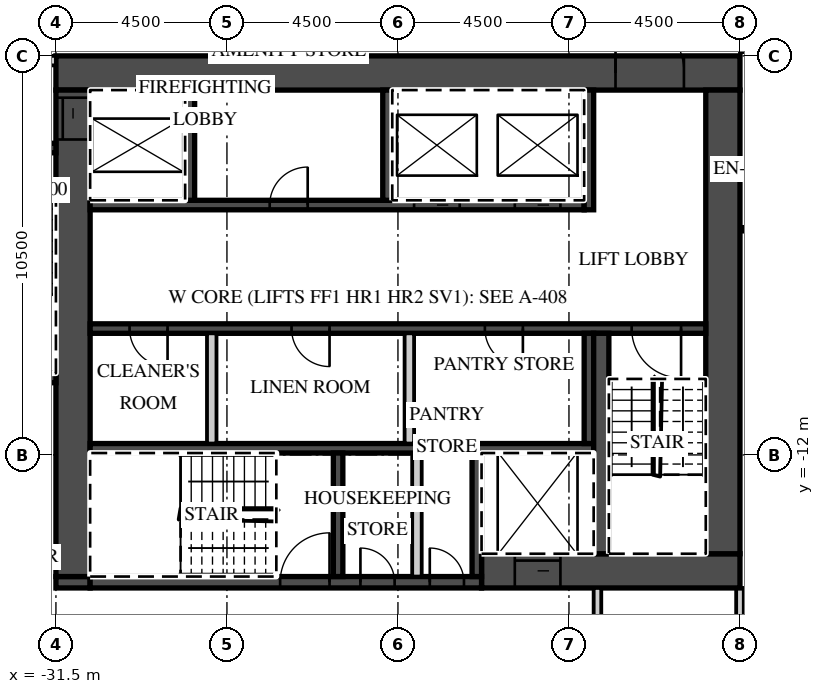
"""IFC4 building model, lengths in metres.
Left out: names, types, materials, properties, quantities, classifications, styles, units other than length and angle.
Written with IfcOpenShell. Run it as: python <this file> out.ifc"""

import sys

from ifc_helpers import new_model, si_unit, direction, frame, frame_2d, origin, place, context, subcontext, project, spatial, rectangle, extrude, element, fill, save


model = new_model("IFC4")
c1 = context("Model", 3, precision=1e-05, world=origin(), true_north=direction((0.0, 1.0)))
c2 = subcontext(c1, "Body", "Model", "MODEL_VIEW")
j1 = project(units=[si_unit("LENGTHUNIT", "METRE"), si_unit("PLANEANGLEUNIT", "RADIAN")], contexts=[c1])
p1 = place(None, origin())
s1 = spatial("IfcSite", under=j1, at=p1, CompositionType="ELEMENT")
p2 = place(p1, origin())
s2 = spatial("IfcBuilding", under=s1, at=p2, CompositionType="ELEMENT")
p3 = place(p2, frame((0.0, 0.0, 278.4)))
s3 = spatial("IfcBuildingStorey", under=s2, at=p3, CompositionType="ELEMENT", Elevation=278.4)
p4 = place(p3, frame((-13.5, -21.396, 0.0), z_axis=(0.0, 0.0, 1.0), x_axis=(0.0, 1.0, 0.0)))
e1 = element("IfcWall", 1, at=p4, inside=s3, PredefinedType="PARTITIONING", context=c2, shape_type="SweptSolid", body=[
    extrude(rectangle(XDim=5.896, YDim=0.2, at=frame_2d((2.948, 0.0))), origin(), (0.0, 0.0, 1.0), 3.02),
])
p5 = place(p3, frame((-13.5, -1.3, 0.0), z_axis=(0.0, 0.0, 1.0), x_axis=(1.0, 0.0, 0.0)))
e2 = element("IfcWall", 2, at=p5, inside=s3, PredefinedType="PARTITIONING", context=c2, shape_type="SweptSolid", body=[
    extrude(rectangle(XDim=50.293, YDim=0.2, at=frame_2d((25.146, 0.0))), origin(), (0.0, 0.0, 1.0), 3.02),
])
p6 = place(p5, frame((2.925, 0.0, 0.0)))
e3 = element("IfcOpeningElement", 3, at=p6, cuts=e2, PredefinedType="OPENING", context=c2, shape_type="SweptSolid", body=[
    extrude(rectangle(XDim=1.0, YDim=2.1, at=frame_2d((0.5, 1.05))), frame((0.0, 0.11, 0.0), z_axis=(0.0, -1.0, 0.0), x_axis=(1.0, 0.0, 0.0)), (0.0, 0.0, 1.0), 0.22),
])
p7 = place(p5, frame((6.938, 0.0, 0.0)))
e4 = element("IfcOpeningElement", 4, at=p7, cuts=e2, PredefinedType="OPENING", context=c2, shape_type="SweptSolid", body=[
    extrude(rectangle(XDim=1.2, YDim=2.1, at=frame_2d((0.6, 1.05))), frame((0.0, 0.11, 0.0), z_axis=(0.0, -1.0, 0.0), x_axis=(1.0, 0.0, 0.0)), (0.0, 0.0, 1.0), 0.22),
])
p8 = place(p5, frame((14.075, 0.0, 0.0)))
e5 = element("IfcOpeningElement", 5, at=p8, cuts=e2, PredefinedType="OPENING", context=c2, shape_type="SweptSolid", body=[
    extrude(rectangle(XDim=1.0, YDim=2.1, at=frame_2d((0.5, 1.05))), frame((0.0, 0.11, 0.0), z_axis=(0.0, -1.0, 0.0), x_axis=(1.0, 0.0, 0.0)), (0.0, 0.0, 1.0), 0.22),
])
p9 = place(p5, frame((18.55, 0.0, 0.0)))
e6 = element("IfcOpeningElement", 6, at=p9, cuts=e2, PredefinedType="OPENING", context=c2, shape_type="SweptSolid", body=[
    extrude(rectangle(XDim=1.0, YDim=2.1, at=frame_2d((0.5, 1.05))), frame((0.0, 0.11, 0.0), z_axis=(0.0, -1.0, 0.0), x_axis=(1.0, 0.0, 0.0)), (0.0, 0.0, 1.0), 0.22),
])
p10 = place(p5, frame((23.075, 0.0, 0.0)))
e7 = element("IfcOpeningElement", 7, at=p10, cuts=e2, PredefinedType="OPENING", context=c2, shape_type="SweptSolid", body=[
    extrude(rectangle(XDim=1.0, YDim=2.1, at=frame_2d((0.5, 1.05))), frame((0.0, 0.11, 0.0), z_axis=(0.0, -1.0, 0.0), x_axis=(1.0, 0.0, 0.0)), (0.0, 0.0, 1.0), 0.22),
])
p11 = place(p5, frame((29.925, 0.0, 0.0)))
e8 = element("IfcOpeningElement", 8, at=p11, cuts=e2, PredefinedType="OPENING", context=c2, shape_type="SweptSolid", body=[
    extrude(rectangle(XDim=1.0, YDim=2.1, at=frame_2d((0.5, 1.05))), frame((0.0, 0.11, 0.0), z_axis=(0.0, -1.0, 0.0), x_axis=(1.0, 0.0, 0.0)), (0.0, 0.0, 1.0), 0.22),
])
p12 = place(p5, frame((32.075, 0.0, 0.0)))
e9 = element("IfcOpeningElement", 9, at=p12, cuts=e2, PredefinedType="OPENING", context=c2, shape_type="SweptSolid", body=[
    extrude(rectangle(XDim=1.0, YDim=2.1, at=frame_2d((0.5, 1.05))), frame((0.0, 0.11, 0.0), z_axis=(0.0, -1.0, 0.0), x_axis=(1.0, 0.0, 0.0)), (0.0, 0.0, 1.0), 0.22),
])
p13 = place(p5, frame((36.55, 0.0, 0.0)))
e10 = element("IfcOpeningElement", 10, at=p13, cuts=e2, PredefinedType="OPENING", context=c2, shape_type="SweptSolid", body=[
    extrude(rectangle(XDim=1.0, YDim=2.1, at=frame_2d((0.5, 1.05))), frame((0.0, 0.11, 0.0), z_axis=(0.0, -1.0, 0.0), x_axis=(1.0, 0.0, 0.0)), (0.0, 0.0, 1.0), 0.22),
])
p14 = place(p5, frame((42.938, 0.0, 0.0)))
e11 = element("IfcOpeningElement", 11, at=p14, cuts=e2, PredefinedType="OPENING", context=c2, shape_type="SweptSolid", body=[
    extrude(rectangle(XDim=1.2, YDim=2.1, at=frame_2d((0.6, 1.05))), frame((0.0, 0.11, 0.0), z_axis=(0.0, -1.0, 0.0), x_axis=(1.0, 0.0, 0.0)), (0.0, 0.0, 1.0), 0.22),
])
p15 = place(p3, frame((-31.5, -1.95, 0.0), z_axis=(0.0, 0.0, 1.0), x_axis=(1.0, 0.0, 0.0)))
e12 = element("IfcWall", 12, at=p15, inside=s3, PredefinedType="SHEAR", context=c2, shape_type="SweptSolid", body=[
    extrude(rectangle(XDim=18.0, YDim=0.9, at=frame_2d((9.0, 0.0))), origin(), (0.0, 0.0, 1.0), 3.02),
])
p16 = place(p15, frame((14.725, 0.0, 0.0)))
e13 = element("IfcOpeningElement", 13, at=p16, cuts=e12, PredefinedType="OPENING", context=c2, shape_type="SweptSolid", body=[
    extrude(rectangle(XDim=1.8, YDim=2.1, at=frame_2d((0.9, 1.05))), frame((0.0, 0.46, 0.0), z_axis=(0.0, -1.0, 0.0), x_axis=(1.0, 0.0, 0.0)), (0.0, 0.0, 1.0), 0.92),
])
p17 = place(p3, frame((-20.3, -15.05, 0.0), z_axis=(0.0, 0.0, 1.0), x_axis=(1.0, 0.0, 0.0)))
e14 = element("IfcWall", 14, at=p17, inside=s3, PredefinedType="SHEAR", context=c2, shape_type="SweptSolid", body=[
    extrude(rectangle(XDim=6.8, YDim=0.9, at=frame_2d((3.4, 0.0))), origin(), (0.0, 0.0, 1.0), 3.02),
])
p18 = place(p17, frame((0.875, 0.0, 0.0)))
e15 = element("IfcOpeningElement", 15, at=p18, cuts=e14, PredefinedType="OPENING", context=c2, shape_type="SweptSolid", body=[
    extrude(rectangle(XDim=1.2, YDim=2.1, at=frame_2d((0.6, 1.05))), frame((0.0, 0.46, 0.0), z_axis=(0.0, -1.0, 0.0), x_axis=(1.0, 0.0, 0.0)), (0.0, 0.0, 1.0), 0.92),
])
p19 = place(p3, frame((-31.5, -15.35, 0.0), z_axis=(0.0, 0.0, 1.0), x_axis=(1.0, 0.0, 0.0)))
e16 = element("IfcWall", 16, at=p19, inside=s3, PredefinedType="SHEAR", context=c2, shape_type="SweptSolid", body=[
    extrude(rectangle(XDim=0.9, YDim=0.3, at=frame_2d((0.45, 0.0))), origin(), (0.0, 0.0, 1.0), 3.02),
])
p20 = place(p3, frame((-30.6, -15.35, 0.0), z_axis=(0.0, 0.0, 1.0), x_axis=(1.0, 0.0, 0.0)))
e17 = element("IfcWall", 17, at=p20, inside=s3, PredefinedType="SHEAR", context=c2, shape_type="SweptSolid", body=[
    extrude(rectangle(XDim=10.3, YDim=0.3, at=frame_2d((5.15, 0.0))), origin(), (0.0, 0.0, 1.0), 3.02),
])
p21 = place(p20, frame((5.0, 0.0, 0.0)))
e18 = element("IfcOpeningElement", 18, at=p21, cuts=e17, PredefinedType="OPENING", context=c2, shape_type="SweptSolid", body=[
    extrude(rectangle(XDim=1.3, YDim=2.1, at=frame_2d((0.65, 1.05))), frame((0.0, 0.16, 0.0), z_axis=(0.0, -1.0, 0.0), x_axis=(1.0, 0.0, 0.0)), (0.0, 0.0, 1.0), 0.32),
])
p22 = place(p20, frame((7.113, 0.0, 0.0)))
e19 = element("IfcOpeningElement", 19, at=p22, cuts=e17, PredefinedType="OPENING", context=c2, shape_type="SweptSolid", body=[
    extrude(rectangle(XDim=0.9, YDim=2.1, at=frame_2d((0.45, 1.05))), frame((0.0, 0.16, 0.0), z_axis=(0.0, -1.0, 0.0), x_axis=(1.0, 0.0, 0.0)), (0.0, 0.0, 1.0), 0.32),
])
p23 = place(p20, frame((8.938, 0.0, 0.0)))
e20 = element("IfcOpeningElement", 20, at=p23, cuts=e17, PredefinedType="OPENING", context=c2, shape_type="SweptSolid", body=[
    extrude(rectangle(XDim=0.9, YDim=2.1, at=frame_2d((0.45, 1.05))), frame((0.0, 0.16, 0.0), z_axis=(0.0, -1.0, 0.0), x_axis=(1.0, 0.0, 0.0)), (0.0, 0.0, 1.0), 0.32),
])
p24 = place(p3, frame((-31.05, -15.2, 0.0), z_axis=(0.0, 0.0, 1.0), x_axis=(0.0, 1.0, 0.0)))
e21 = element("IfcWall", 21, at=p24, inside=s3, PredefinedType="SHEAR", context=c2, shape_type="SweptSolid", body=[
    extrude(rectangle(XDim=12.8, YDim=0.9, at=frame_2d((6.4, 0.0))), origin(), (0.0, 0.0, 1.0), 3.02),
])
p25 = place(p24, frame((11.5, 0.0, 0.0)))
e22 = element("IfcOpeningElement", 22, at=p25, cuts=e21, PredefinedType="OPENING", context=c2, shape_type="SweptSolid", body=[
    extrude(rectangle(XDim=1.1, YDim=2.1, at=frame_2d((0.55, 1.05))), frame((0.0, 0.46, 0.0), z_axis=(0.0, -1.0, 0.0), x_axis=(1.0, 0.0, 0.0)), (0.0, 0.0, 1.0), 0.92),
])
p26 = place(p3, frame((-13.95, -14.6, 0.0), z_axis=(0.0, 0.0, 1.0), x_axis=(0.0, 1.0, 0.0)))
e23 = element("IfcWall", 23, at=p26, inside=s3, PredefinedType="SHEAR", context=c2, shape_type="SweptSolid", body=[
    extrude(rectangle(XDim=12.2, YDim=0.9, at=frame_2d((6.1, 0.0))), origin(), (0.0, 0.0, 1.0), 3.02),
])
p27 = place(p3, frame((-30.6, -5.425, 0.0), z_axis=(0.0, 0.0, 1.0), x_axis=(1.0, 0.0, 0.0)))
e24 = element("IfcWall", 24, at=p27, inside=s3, PredefinedType="SHEAR", context=c2, shape_type="SweptSolid", body=[
    extrude(rectangle(XDim=13.0, YDim=0.25, at=frame_2d((6.5, 0.0))), origin(), (0.0, 0.0, 1.0), 3.02),
])
p28 = place(p27, frame((8.525, 0.0, 0.0)))
e25 = element("IfcOpeningElement", 25, at=p28, cuts=e24, PredefinedType="OPENING", context=c2, shape_type="SweptSolid", body=[
    extrude(rectangle(XDim=1.2, YDim=2.1, at=frame_2d((0.6, 1.05))), frame((0.0, 0.135, 0.0), z_axis=(0.0, -1.0, 0.0), x_axis=(1.0, 0.0, 0.0)), (0.0, 0.0, 1.0), 0.27),
])
p29 = place(p27, frame((11.175, 0.0, 0.0)))
e26 = element("IfcOpeningElement", 26, at=p29, cuts=e24, PredefinedType="OPENING", context=c2, shape_type="SweptSolid", body=[
    extrude(rectangle(XDim=1.2, YDim=2.1, at=frame_2d((0.6, 1.05))), frame((0.0, 0.135, 0.0), z_axis=(0.0, -1.0, 0.0), x_axis=(1.0, 0.0, 0.0)), (0.0, 0.0, 1.0), 0.27),
])
p30 = place(p27, frame((4.725, 0.0, 0.0)))
e27 = element("IfcOpeningElement", 27, at=p30, cuts=e24, PredefinedType="OPENING", context=c2, shape_type="SweptSolid", body=[
    extrude(rectangle(XDim=1.0, YDim=2.1, at=frame_2d((0.5, 1.05))), frame((0.0, 0.135, 0.0), z_axis=(0.0, -1.0, 0.0), x_axis=(1.0, 0.0, 0.0)), (0.0, 0.0, 1.0), 0.27),
])
p31 = place(p3, frame((-17.475, -5.55, 0.0), z_axis=(0.0, 0.0, 1.0), x_axis=(0.0, 1.0, 0.0)))
e28 = element("IfcWall", 28, at=p31, inside=s3, PredefinedType="SHEAR", context=c2, shape_type="SweptSolid", body=[
    extrude(rectangle(XDim=3.15, YDim=0.25, at=frame_2d((1.575, 0.0))), origin(), (0.0, 0.0, 1.0), 3.02),
])
for number, where, z_axis, x_axis in (
    (29, (-27.975, -5.3, 0.0), (0.0, 0.0, 1.0), (0.0, 1.0, 0.0)),
    (30, (-22.775, -5.3, 0.0), (0.0, 0.0, 1.0), (0.0, 1.0, 0.0)),
):
    element("IfcWall", number, at=place(p3, frame(where, z_axis=z_axis, x_axis=x_axis)), inside=s3, PredefinedType="SHEAR", context=c2, shape_type="SweptSolid", body=[
        extrude(rectangle(XDim=2.9, YDim=0.25, at=frame_2d((1.45, 0.0))), origin(), (0.0, 0.0, 1.0), 3.02),
    ])
p32 = place(p3, frame((-30.6, -8.675, 0.0), z_axis=(0.0, 0.0, 1.0), x_axis=(1.0, 0.0, 0.0)))
e31 = element("IfcWall", 31, at=p32, inside=s3, PredefinedType="SHEAR", context=c2, shape_type="SweptSolid", body=[
    extrude(rectangle(XDim=16.2, YDim=0.25, at=frame_2d((8.1, 0.0))), origin(), (0.0, 0.0, 1.0), 3.02),
])
p33 = place(p32, frame((14.25, 0.0, 0.0)))
e32 = element("IfcOpeningElement", 32, at=p33, cuts=e31, PredefinedType="OPENING", context=c2, shape_type="SweptSolid", body=[
    extrude(rectangle(XDim=1.3, YDim=2.1, at=frame_2d((0.65, 1.05))), frame((0.0, 0.135, 0.0), z_axis=(0.0, -1.0, 0.0), x_axis=(1.0, 0.0, 0.0)), (0.0, 0.0, 1.0), 0.27),
])
p34 = place(p32, frame((1.038, 0.0, 0.0)))
e33 = element("IfcOpeningElement", 33, at=p34, cuts=e31, PredefinedType="OPENING", context=c2, shape_type="SweptSolid", body=[
    extrude(rectangle(XDim=1.0, YDim=2.1, at=frame_2d((0.5, 1.05))), frame((0.0, 0.135, 0.0), z_axis=(0.0, -1.0, 0.0), x_axis=(1.0, 0.0, 0.0)), (0.0, 0.0, 1.0), 0.27),
])
p35 = place(p32, frame((5.3, 0.0, 0.0)))
e34 = element("IfcOpeningElement", 34, at=p35, cuts=e31, PredefinedType="OPENING", context=c2, shape_type="SweptSolid", body=[
    extrude(rectangle(XDim=1.0, YDim=2.1, at=frame_2d((0.5, 1.05))), frame((0.0, 0.135, 0.0), z_axis=(0.0, -1.0, 0.0), x_axis=(1.0, 0.0, 0.0)), (0.0, 0.0, 1.0), 0.27),
])
p36 = place(p32, frame((10.387, 0.0, 0.0)))
e35 = element("IfcOpeningElement", 35, at=p36, cuts=e31, PredefinedType="OPENING", context=c2, shape_type="SweptSolid", body=[
    extrude(rectangle(XDim=1.0, YDim=2.1, at=frame_2d((0.5, 1.05))), frame((0.0, 0.135, 0.0), z_axis=(0.0, -1.0, 0.0), x_axis=(1.0, 0.0, 0.0)), (0.0, 0.0, 1.0), 0.27),
])
p37 = place(p3, frame((-30.6, -11.825, 0.0), z_axis=(0.0, 0.0, 1.0), x_axis=(1.0, 0.0, 0.0)))
e36 = element("IfcWall", 36, at=p37, inside=s3, PredefinedType="SHEAR", context=c2, shape_type="SweptSolid", body=[
    extrude(rectangle(XDim=13.25, YDim=0.25, at=frame_2d((6.625, 0.0))), origin(), (0.0, 0.0, 1.0), 3.02),
])
p38 = place(p3, frame((-17.475, -11.7, 0.0), z_axis=(0.0, 0.0, 1.0), x_axis=(0.0, 1.0, 0.0)))
e37 = element("IfcWall", 37, at=p38, inside=s3, PredefinedType="SHEAR", context=c2, shape_type="SweptSolid", body=[
    extrude(rectangle(XDim=2.9, YDim=0.25, at=frame_2d((1.45, 0.0))), origin(), (0.0, 0.0, 1.0), 3.02),
])
for number, where, z_axis, x_axis in (
    (38, (-27.4, -11.7, 0.0), (0.0, 0.0, 1.0), (0.0, 1.0, 0.0)),
    (39, (-22.2, -11.7, 0.0), (0.0, 0.0, 1.0), (0.0, 1.0, 0.0)),
):
    element("IfcWall", number, at=place(p3, frame(where, z_axis=z_axis, x_axis=x_axis)), inside=s3, PredefinedType="PARTITIONING", context=c2, shape_type="SweptSolid", body=[
        extrude(rectangle(XDim=2.9, YDim=0.25, at=frame_2d((1.45, 0.0))), origin(), (0.0, 0.0, 1.0), 3.02),
    ])
p39 = place(p3, frame((-17.15, -14.6, 0.0), z_axis=(0.0, 0.0, 1.0), x_axis=(0.0, 1.0, 0.0)))
e40 = element("IfcWall", 40, at=p39, inside=s3, PredefinedType="SHEAR", context=c2, shape_type="SweptSolid", body=[
    extrude(rectangle(XDim=5.8, YDim=0.4, at=frame_2d((2.9, 0.0))), origin(), (0.0, 0.0, 1.0), 3.02),
])
for number, where, z_axis, x_axis in (
    (41, (-20.425, -15.2, 0.0), (0.0, 0.0, 1.0), (0.0, 1.0, 0.0)),
    (42, (-24.075, -15.2, 0.0), (0.0, 0.0, 1.0), (0.0, 1.0, 0.0)),
):
    element("IfcWall", number, at=place(p3, frame(where, z_axis=z_axis, x_axis=x_axis)), inside=s3, PredefinedType="SHEAR", context=c2, shape_type="SweptSolid", body=[
        extrude(rectangle(XDim=3.25, YDim=0.25, at=frame_2d((1.625, 0.0))), origin(), (0.0, 0.0, 1.0), 3.02),
    ])
p40 = place(p3, frame((-22.0, -15.2, 0.0), z_axis=(0.0, 0.0, 1.0), x_axis=(0.0, 1.0, 0.0)))
e43 = element("IfcWall", 43, at=p40, inside=s3, PredefinedType="PARTITIONING", context=c2, shape_type="SweptSolid", body=[
    extrude(rectangle(XDim=3.25, YDim=0.25, at=frame_2d((1.625, 0.0))), origin(), (0.0, 0.0, 1.0), 3.02),
])
p41 = place(p3, frame((-39.627, -1.625, 0.0), z_axis=(0.0, 0.0, 1.0), x_axis=(1.0, 0.0, 0.0)))
e44 = element("IfcWall", 44, at=p41, inside=s3, PredefinedType="PARTITIONING", context=c2, shape_type="SweptSolid", body=[
    extrude(rectangle(XDim=8.127, YDim=0.25, at=frame_2d((4.063, 0.0))), origin(), (0.0, 0.0, 1.0), 3.02),
])
p42 = place(p41, frame((6.202, 0.0, 0.0)))
e45 = element("IfcOpeningElement", 45, at=p42, cuts=e44, PredefinedType="OPENING", context=c2, shape_type="SweptSolid", body=[
    extrude(rectangle(XDim=1.3, YDim=2.1, at=frame_2d((0.65, 1.05))), frame((0.0, 0.135, 0.0), z_axis=(0.0, -1.0, 0.0), x_axis=(1.0, 0.0, 0.0)), (0.0, 0.0, 1.0), 0.27),
])
p43 = place(p41, frame((3.777, 0.0, 0.0)))
e46 = element("IfcOpeningElement", 46, at=p43, cuts=e44, PredefinedType="OPENING", context=c2, shape_type="SweptSolid", body=[
    extrude(rectangle(XDim=1.1, YDim=2.1, at=frame_2d((0.55, 1.05))), frame((0.0, 0.135, 0.0), z_axis=(0.0, -1.0, 0.0), x_axis=(1.0, 0.0, 0.0)), (0.0, 0.0, 1.0), 0.27),
])
p44 = place(p3, frame((-34.05, -3.925, 0.0), z_axis=(0.0, 0.0, 1.0), x_axis=(1.0, 0.0, 0.0)))
e47 = element("IfcWall", 47, at=p44, inside=s3, PredefinedType="SHEAR", context=c2, shape_type="SweptSolid", body=[
    extrude(rectangle(XDim=2.55, YDim=0.25, at=frame_2d((1.275, 0.0))), origin(), (0.0, 0.0, 1.0), 3.02),
])
p45 = place(p44, frame((0.625, 0.0, 0.0)))
e48 = element("IfcOpeningElement", 48, at=p45, cuts=e47, PredefinedType="OPENING", context=c2, shape_type="SweptSolid", body=[
    extrude(rectangle(XDim=1.3, YDim=2.1, at=frame_2d((0.65, 1.05))), frame((0.0, 0.135, 0.0), z_axis=(0.0, -1.0, 0.0), x_axis=(1.0, 0.0, 0.0)), (0.0, 0.0, 1.0), 0.27),
])
p46 = place(p3, frame((-34.05, -9.975, 0.0), z_axis=(0.0, 0.0, 1.0), x_axis=(1.0, 0.0, 0.0)))
e49 = element("IfcWall", 49, at=p46, inside=s3, PredefinedType="SHEAR", context=c2, shape_type="SweptSolid", body=[
    extrude(rectangle(XDim=2.55, YDim=0.25, at=frame_2d((1.275, 0.0))), origin(), (0.0, 0.0, 1.0), 3.02),
])
p47 = place(p3, frame((-17.25, -17.7, 0.0), z_axis=(0.0, 0.0, 1.0), x_axis=(0.0, 1.0, 0.0)))
e50 = element("IfcWall", 50, at=p47, inside=s3, PredefinedType="PARTITIONING", context=c2, shape_type="SweptSolid", body=[
    extrude(rectangle(XDim=2.2, YDim=0.2, at=frame_2d((1.1, 0.0))), origin(), (0.0, 0.0, 1.0), 3.02),
])
p48 = place(p28, origin())
e51 = element("IfcDoor", 51, at=p48, inside=s3, OperationType="SLIDING_TO_LEFT", PredefinedType="DOOR", context=c2, shape_type="SweptSolid", body=[
    extrude(rectangle(XDim=1.2, YDim=2.1, at=frame_2d((0.6, 1.05))), frame((0.0, 0.025, 0.0), z_axis=(0.0, -1.0, 0.0), x_axis=(1.0, 0.0, 0.0)), (0.0, 0.0, 1.0), 0.05),
])
fill(e25, e51)
p49 = place(p29, origin())
e52 = element("IfcDoor", 52, at=p49, inside=s3, OperationType="SLIDING_TO_RIGHT", PredefinedType="DOOR", context=c2, shape_type="SweptSolid", body=[
    extrude(rectangle(XDim=1.2, YDim=2.1, at=frame_2d((0.6, 1.05))), frame((0.0, 0.025, 0.0), z_axis=(0.0, -1.0, 0.0), x_axis=(1.0, 0.0, 0.0)), (0.0, 0.0, 1.0), 0.05),
])
fill(e26, e52)
p50 = place(p18, origin())
e53 = element("IfcDoor", 53, at=p50, inside=s3, OperationType="SLIDING_TO_LEFT", PredefinedType="DOOR", context=c2, shape_type="SweptSolid", body=[
    extrude(rectangle(XDim=1.2, YDim=2.1, at=frame_2d((0.6, 1.05))), frame((0.0, 0.025, 0.0), z_axis=(0.0, -1.0, 0.0), x_axis=(1.0, 0.0, 0.0)), (0.0, 0.0, 1.0), 0.05),
])
fill(e15, e53)
p51 = place(p25, origin())
e54 = element("IfcDoor", 54, at=p51, inside=s3, OperationType="SLIDING_TO_RIGHT", PredefinedType="DOOR", context=c2, shape_type="SweptSolid", body=[
    extrude(rectangle(XDim=1.1, YDim=2.1, at=frame_2d((0.55, 1.05))), frame((0.0, 0.025, 0.0), z_axis=(0.0, -1.0, 0.0), x_axis=(1.0, 0.0, 0.0)), (0.0, 0.0, 1.0), 0.05),
])
fill(e22, e54)
p52 = place(p16, origin())
e55 = element("IfcDoor", 55, at=p52, inside=s3, OperationType="DOUBLE_DOOR_DOUBLE_SWING", PredefinedType="DOOR", context=c2, shape_type="SweptSolid", body=[
    extrude(rectangle(XDim=1.8, YDim=2.1, at=frame_2d((0.9, 1.05))), frame((0.0, 0.025, 0.0), z_axis=(0.0, -1.0, 0.0), x_axis=(1.0, 0.0, 0.0)), (0.0, 0.0, 1.0), 0.05),
])
fill(e13, e55)
p53 = place(p33, origin())
e56 = element("IfcDoor", 56, at=p53, inside=s3, OperationType="SINGLE_SWING_RIGHT", PredefinedType="DOOR", context=c2, shape_type="SweptSolid", body=[
    extrude(rectangle(XDim=1.3, YDim=2.1, at=frame_2d((0.65, 1.05))), frame((0.0, 0.025, 0.0), z_axis=(0.0, -1.0, 0.0), x_axis=(1.0, 0.0, 0.0)), (0.0, 0.0, 1.0), 0.05),
])
fill(e32, e56)
p54 = place(p21, origin())
e57 = element("IfcDoor", 57, at=p54, inside=s3, OperationType="SINGLE_SWING_RIGHT", PredefinedType="DOOR", context=c2, shape_type="SweptSolid", body=[
    extrude(rectangle(XDim=1.3, YDim=2.1, at=frame_2d((0.65, 1.05))), frame((0.0, 0.025, 0.0), z_axis=(0.0, -1.0, 0.0), x_axis=(1.0, 0.0, 0.0)), (0.0, 0.0, 1.0), 0.05),
])
fill(e18, e57)
p55 = place(p22, origin())
e58 = element("IfcDoor", 58, at=p55, inside=s3, OperationType="SINGLE_SWING_LEFT", PredefinedType="DOOR", context=c2, shape_type="SweptSolid", body=[
    extrude(rectangle(XDim=0.9, YDim=2.1, at=frame_2d((0.45, 1.05))), frame((0.0, 0.025, 0.0), z_axis=(0.0, -1.0, 0.0), x_axis=(1.0, 0.0, 0.0)), (0.0, 0.0, 1.0), 0.05),
])
fill(e19, e58)
p56 = place(p23, origin())
e59 = element("IfcDoor", 59, at=p56, inside=s3, OperationType="SINGLE_SWING_LEFT", PredefinedType="DOOR", context=c2, shape_type="SweptSolid", body=[
    extrude(rectangle(XDim=0.9, YDim=2.1, at=frame_2d((0.45, 1.05))), frame((0.0, 0.025, 0.0), z_axis=(0.0, -1.0, 0.0), x_axis=(1.0, 0.0, 0.0)), (0.0, 0.0, 1.0), 0.05),
])
fill(e20, e59)
p57 = place(p34, origin())
e60 = element("IfcDoor", 60, at=p57, inside=s3, OperationType="SINGLE_SWING_RIGHT", PredefinedType="DOOR", context=c2, shape_type="SweptSolid", body=[
    extrude(rectangle(XDim=1.0, YDim=2.1, at=frame_2d((0.5, 1.05))), frame((0.0, 0.025, 0.0), z_axis=(0.0, -1.0, 0.0), x_axis=(1.0, 0.0, 0.0)), (0.0, 0.0, 1.0), 0.05),
])
fill(e33, e60)
p58 = place(p35, origin())
e61 = element("IfcDoor", 61, at=p58, inside=s3, OperationType="SINGLE_SWING_RIGHT", PredefinedType="DOOR", context=c2, shape_type="SweptSolid", body=[
    extrude(rectangle(XDim=1.0, YDim=2.1, at=frame_2d((0.5, 1.05))), frame((0.0, 0.025, 0.0), z_axis=(0.0, -1.0, 0.0), x_axis=(1.0, 0.0, 0.0)), (0.0, 0.0, 1.0), 0.05),
])
fill(e34, e61)
p59 = place(p36, origin())
e62 = element("IfcDoor", 62, at=p59, inside=s3, OperationType="SINGLE_SWING_RIGHT", PredefinedType="DOOR", context=c2, shape_type="SweptSolid", body=[
    extrude(rectangle(XDim=1.0, YDim=2.1, at=frame_2d((0.5, 1.05))), frame((0.0, 0.025, 0.0), z_axis=(0.0, -1.0, 0.0), x_axis=(1.0, 0.0, 0.0)), (0.0, 0.0, 1.0), 0.05),
])
fill(e35, e62)
p60 = place(p30, origin())
e63 = element("IfcDoor", 63, at=p60, inside=s3, OperationType="SINGLE_SWING_RIGHT", PredefinedType="DOOR", context=c2, shape_type="SweptSolid", body=[
    extrude(rectangle(XDim=1.0, YDim=2.1, at=frame_2d((0.5, 1.05))), frame((0.0, 0.025, 0.0), z_axis=(0.0, -1.0, 0.0), x_axis=(1.0, 0.0, 0.0)), (0.0, 0.0, 1.0), 0.05),
])
fill(e27, e63)
save(model, sys.argv[1])
